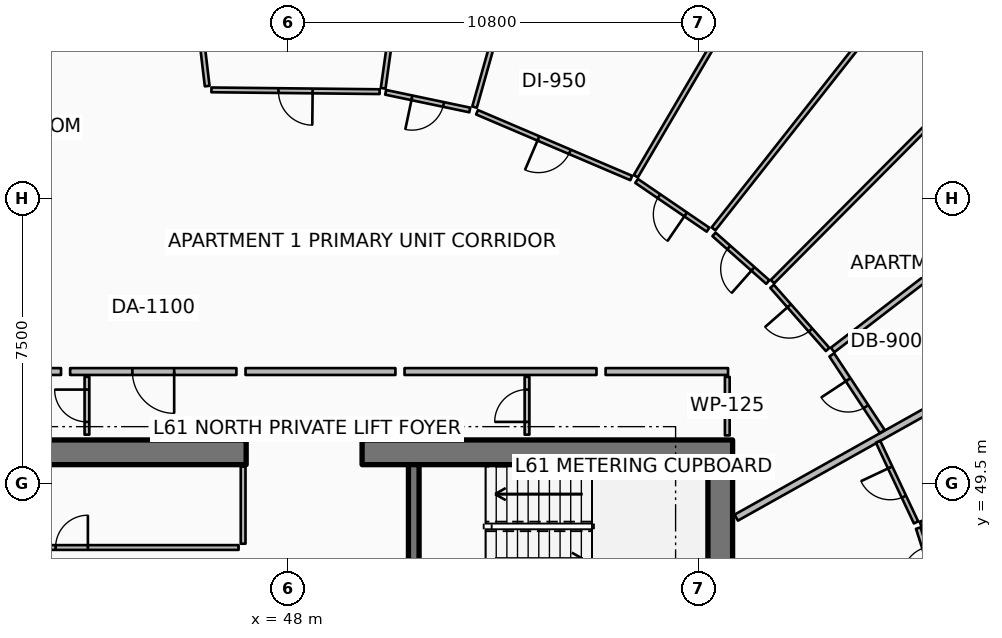
"""IFC4 building model, lengths in metres.
Left out: names, types, materials, properties, quantities, classifications, styles, units other than length and angle.
Written with IfcOpenShell. Run it as: python <this file> out.ifc"""

import sys

from ifc_helpers import new_model, si_unit, direction, frame, frame_2d, origin, place, context, subcontext, project, spatial, rectangle, extrude, element, fill, save


model = new_model("IFC4")
c1 = context("Model", 3, precision=1e-05, world=origin(), true_north=direction((0.0, 1.0)))
c2 = subcontext(c1, "Body", "Model", "MODEL_VIEW")
j1 = project(units=[si_unit("LENGTHUNIT", "METRE"), si_unit("PLANEANGLEUNIT", "RADIAN")], contexts=[c1])
p1 = place(None, origin())
s1 = spatial("IfcSite", under=j1, at=p1, CompositionType="ELEMENT")
p2 = place(p1, origin())
s2 = spatial("IfcBuilding", under=s1, at=p2, CompositionType="ELEMENT")
p3 = place(p2, frame((0.0, 0.0, 244.4)))
s3 = spatial("IfcBuildingStorey", under=s2, at=p3, CompositionType="ELEMENT", Elevation=244.4)
for number, where, z_axis, x_axis in (
    (1, (37.15, 50.325, 0.0), (0.0, 0.0, 1.0), (1.0, 0.0, 0.0)),
    (2, (49.95, 50.325, 0.0), (0.0, 0.0, 1.0), (1.0, 0.0, 0.0)),
):
    element("IfcWall", number, at=place(p3, frame(where, z_axis=z_axis, x_axis=x_axis)), inside=s3, PredefinedType="SHEAR", context=c2, shape_type="SweptSolid", body=[
        extrude(rectangle(XDim=9.75, YDim=0.65, at=frame_2d((4.875, 0.0))), origin(), (0.0, 0.0, 1.0), 3.85),
    ])
p4 = place(p3, frame((59.375, 34.0, 0.0), z_axis=(0.0, 0.0, 1.0), x_axis=(0.0, 1.0, 0.0)))
e3 = element("IfcWall", 3, at=p4, inside=s3, PredefinedType="SHEAR", context=c2, shape_type="SweptSolid", body=[
    extrude(rectangle(XDim=16.0, YDim=0.65, at=frame_2d((8.0, 0.0))), origin(), (0.0, 0.0, 1.0), 3.85),
])
p5 = place(p3, frame((51.31, 46.5, 0.0), z_axis=(0.0, 0.0, 1.0), x_axis=(0.0, 1.0, 0.0)))
e4 = element("IfcWall", 4, at=p5, inside=s3, PredefinedType="SHEAR", context=c2, shape_type="SweptSolid", body=[
    extrude(rectangle(XDim=3.5, YDim=0.28, at=frame_2d((1.75, 0.0))), origin(), (0.0, 0.0, 1.0), 3.85),
])
p6 = place(p3, frame((46.82, 47.92, 0.0), z_axis=(0.0, 0.0, 1.0), x_axis=(0.0, 1.0, 0.0)))
e5 = element("IfcWall", 5, at=p6, inside=s3, PredefinedType="PARTITIONING", context=c2, shape_type="SweptSolid", body=[
    extrude(rectangle(XDim=2.03, YDim=0.125, at=frame_2d((1.015, 0.0))), origin(), (0.0, 0.0, 1.0), 3.03),
])
p7 = place(p3, frame((37.92, 47.82, 0.0), z_axis=(0.0, 0.0, 1.0), x_axis=(1.0, 0.0, 0.0)))
e6 = element("IfcWall", 6, at=p7, inside=s3, PredefinedType="PARTITIONING", context=c2, shape_type="SweptSolid", body=[
    extrude(rectangle(XDim=8.78, YDim=0.125, at=frame_2d((4.39, 0.0))), origin(), (0.0, 0.0, 1.0), 3.03),
])
p8 = place(p7, frame((3.965, 0.0, 0.0)))
e7 = element("IfcOpeningElement", 7, at=p8, cuts=e6, PredefinedType="OPENING", context=c2, shape_type="SweptSolid", body=[
    extrude(rectangle(XDim=0.85, YDim=2.06, at=frame_2d((0.425, 1.03))), frame((0.0, 0.073, 0.0), z_axis=(0.0, -1.0, 0.0), x_axis=(1.0, 0.0, 0.0)), (0.0, 0.0, 1.0), 0.145),
])
p9 = place(p3, frame((59.56, 50.77, 0.0), z_axis=(0.0, 0.0, 1.0), x_axis=(0.0, 1.0, 0.0)))
e8 = element("IfcWall", 8, at=p9, inside=s3, PredefinedType="PARTITIONING", context=c2, shape_type="SweptSolid", body=[
    extrude(rectangle(XDim=1.54, YDim=0.125, at=frame_2d((0.77, 0.0))), origin(), (0.0, 0.0, 1.0), 3.03),
])
p10 = place(p3, frame((42.71, 50.79, 0.0), z_axis=(0.0, 0.0, 1.0), x_axis=(0.0, 1.0, 0.0)))
e9 = element("IfcWall", 9, at=p10, inside=s3, PredefinedType="PARTITIONING", context=c2, shape_type="SweptSolid", body=[
    extrude(rectangle(XDim=1.52, YDim=0.125, at=frame_2d((0.76, 0.0))), origin(), (0.0, 0.0, 1.0), 2.957),
])
p11 = place(p10, frame((0.335, 0.0, 0.0)))
e10 = element("IfcOpeningElement", 10, at=p11, cuts=e9, PredefinedType="OPENING", context=c2, shape_type="SweptSolid", body=[
    extrude(rectangle(XDim=0.85, YDim=2.06, at=frame_2d((0.425, 1.03))), frame((0.0, 0.073, 0.0), z_axis=(0.0, -1.0, 0.0), x_axis=(1.0, 0.0, 0.0)), (0.0, 0.0, 1.0), 0.145),
])
p12 = place(p3, frame((54.29, 50.79, 0.0), z_axis=(0.0, 0.0, 1.0), x_axis=(0.0, 1.0, 0.0)))
e11 = element("IfcWall", 11, at=p12, inside=s3, PredefinedType="PARTITIONING", context=c2, shape_type="SweptSolid", body=[
    extrude(rectangle(XDim=1.52, YDim=0.125, at=frame_2d((0.76, 0.0))), origin(), (0.0, 0.0, 1.0), 3.03),
])
p13 = place(p12, frame((0.335, 0.0, 0.0)))
e12 = element("IfcOpeningElement", 12, at=p13, cuts=e11, PredefinedType="OPENING", context=c2, shape_type="SweptSolid", body=[
    extrude(rectangle(XDim=0.85, YDim=2.06, at=frame_2d((0.425, 1.03))), frame((0.0, 0.073, 0.0), z_axis=(0.0, -1.0, 0.0), x_axis=(1.0, 0.0, 0.0)), (0.0, 0.0, 1.0), 0.145),
])
p14 = place(p3, frame((59.796, 48.606, 0.0), z_axis=(0.0, 0.0, 1.0), x_axis=(0.872493213488, 0.488626229767, 0.0)))
e13 = element("IfcWall", 13, at=p14, inside=s3, PredefinedType="PARTITIONING", context=c2, shape_type="SweptSolid", body=[
    extrude(rectangle(XDim=16.91, YDim=0.18, at=frame_2d((8.455, 0.0))), origin(), (0.0, 0.0, 1.0), 2.957),
])
p15 = place(p3, frame((46.643, 52.45, 0.0), z_axis=(0.0, 0.0, 1.0), x_axis=(-1.0, 0.0, 0.0)))
e14 = element("IfcWall", 14, at=p15, inside=s3, PredefinedType="PARTITIONING", context=c2, shape_type="SweptSolid", body=[
    extrude(rectangle(XDim=4.376, YDim=0.18, at=frame_2d((2.188, 0.0))), origin(), (0.0, 0.0, 1.0), 2.957),
])
p16 = place(p15, frame((1.638, 0.0, 0.0)))
e15 = element("IfcOpeningElement", 15, at=p16, cuts=e14, PredefinedType="OPENING", context=c2, shape_type="SweptSolid", body=[
    extrude(rectangle(XDim=1.1, YDim=2.1, at=frame_2d((0.55, 1.05))), frame((0.0, 0.1, 0.0), z_axis=(0.0, -1.0, 0.0), x_axis=(1.0, 0.0, 0.0)), (0.0, 0.0, 1.0), 0.2),
])
p17 = place(p3, frame((59.58, 52.45, 0.0), z_axis=(0.0, 0.0, 1.0), x_axis=(-1.0, 0.0, 0.0)))
e16 = element("IfcWall", 16, at=p17, inside=s3, PredefinedType="PARTITIONING", context=c2, shape_type="SweptSolid", body=[
    extrude(rectangle(XDim=3.222, YDim=0.18, at=frame_2d((1.611, 0.0))), origin(), (0.0, 0.0, 1.0), 2.957),
])
p18 = place(p3, frame((63.639, 50.872, 0.0), z_axis=(0.0, 0.0, 1.0), x_axis=(-0.550539267926, 0.834809268319, 0.0)))
e17 = element("IfcWall", 17, at=p18, inside=s3, PredefinedType="PARTITIONING", context=c2, shape_type="SweptSolid", body=[
    extrude(rectangle(XDim=2.414, YDim=0.15, at=frame_2d((1.207, 0.0))), origin(), (0.0, 0.0, 1.0), 2.957),
])
p19 = place(p18, frame((0.782, 0.0, 0.0)))
e18 = element("IfcOpeningElement", 18, at=p19, cuts=e17, PredefinedType="OPENING", context=c2, shape_type="SweptSolid", body=[
    extrude(rectangle(XDim=0.85, YDim=2.06, at=frame_2d((0.425, 1.03))), frame((0.0, 0.085, 0.0), z_axis=(0.0, -1.0, 0.0), x_axis=(1.0, 0.0, 0.0)), (0.0, 0.0, 1.0), 0.17),
])
p20 = place(p3, frame((62.331, 53.018, 0.0), z_axis=(0.0, 0.0, 1.0), x_axis=(0.792803030826, 0.609477935871, 0.0)))
e19 = element("IfcWall", 19, at=p20, inside=s3, PredefinedType="PARTITIONING", context=c2, shape_type="SweptSolid", body=[
    extrude(rectangle(XDim=4.46, YDim=0.15, at=frame_2d((2.23, 0.0))), origin(), (0.0, 0.0, 1.0), 3.03),
])
p21 = place(p3, frame((60.749, 54.815, 0.0), z_axis=(0.0, 0.0, 1.0), x_axis=(0.705267705861, 0.708941085753, 0.0)))
e20 = element("IfcWall", 20, at=p21, inside=s3, PredefinedType="PARTITIONING", context=c2, shape_type="SweptSolid", body=[
    extrude(rectangle(XDim=11.498, YDim=0.125, at=frame_2d((5.749, 0.0))), origin(), (0.0, 0.0, 1.0), 3.03),
])
p22 = place(p3, frame((62.2, 53.031, 0.0), z_axis=(0.0, 0.0, 1.0), x_axis=(-0.660650282497, 0.750693815238, 0.0)))
e21 = element("IfcWall", 21, at=p22, inside=s3, PredefinedType="PARTITIONING", context=c2, shape_type="SweptSolid", body=[
    extrude(rectangle(XDim=2.212, YDim=0.125, at=frame_2d((1.106, 0.0))), origin(), (0.0, 0.0, 1.0), 3.03),
])
p23 = place(p22, frame((0.681, 0.0, 0.0)))
e22 = element("IfcOpeningElement", 22, at=p23, cuts=e21, PredefinedType="OPENING", context=c2, shape_type="SweptSolid", body=[
    extrude(rectangle(XDim=0.85, YDim=2.06, at=frame_2d((0.425, 1.03))), frame((0.0, 0.073, 0.0), z_axis=(0.0, -1.0, 0.0), x_axis=(1.0, 0.0, 0.0)), (0.0, 0.0, 1.0), 0.145),
])
p24 = place(p3, frame((60.626, 54.805, 0.0), z_axis=(0.0, 0.0, 1.0), x_axis=(-0.748419746602, 0.663225363581, 0.0)))
e23 = element("IfcWall", 23, at=p24, inside=s3, PredefinedType="PARTITIONING", context=c2, shape_type="SweptSolid", body=[
    extrude(rectangle(XDim=1.891, YDim=0.125, at=frame_2d((0.946, 0.0))), origin(), (0.0, 0.0, 1.0), 2.957),
])
p25 = place(p24, frame((0.521, 0.0, 0.0)))
e24 = element("IfcOpeningElement", 24, at=p25, cuts=e23, PredefinedType="OPENING", context=c2, shape_type="SweptSolid", body=[
    extrude(rectangle(XDim=0.85, YDim=2.06, at=frame_2d((0.425, 1.03))), frame((0.0, 0.073, 0.0), z_axis=(0.0, -1.0, 0.0), x_axis=(1.0, 0.0, 0.0)), (0.0, 0.0, 1.0), 0.145),
])
p26 = place(p3, frame((56.118, 52.45, 0.0), z_axis=(0.0, 0.0, 1.0), x_axis=(-1.0, 0.0, 0.0)))
e25 = element("IfcWall", 25, at=p26, inside=s3, PredefinedType="PARTITIONING", context=c2, shape_type="SweptSolid", body=[
    extrude(rectangle(XDim=5.051, YDim=0.18, at=frame_2d((2.525, 0.0))), origin(), (0.0, 0.0, 1.0), 2.957),
])
p27 = place(p3, frame((59.198, 56.204, 0.0), z_axis=(0.0, 0.0, 1.0), x_axis=(0.619101452742, 0.785311015593, 0.0)))
e26 = element("IfcWall", 26, at=p27, inside=s3, PredefinedType="PARTITIONING", context=c2, shape_type="SweptSolid", body=[
    extrude(rectangle(XDim=11.509, YDim=0.125, at=frame_2d((5.754, 0.0))), origin(), (0.0, 0.0, 1.0), 2.957),
])
p28 = place(p3, frame((57.153, 57.588, 0.0), z_axis=(0.0, 0.0, 1.0), x_axis=(0.506323477253, 0.862343630105, 0.0)))
e27 = element("IfcWall", 27, at=p28, inside=s3, PredefinedType="PARTITIONING", context=c2, shape_type="SweptSolid", body=[
    extrude(rectangle(XDim=9.988, YDim=0.125, at=frame_2d((4.994, 0.0))), origin(), (0.0, 0.0, 1.0), 3.03),
])
p29 = place(p3, frame((59.053, 56.182, 0.0), z_axis=(0.0, 0.0, 1.0), x_axis=(-0.825709590898, 0.56409544538, 0.0)))
e28 = element("IfcWall", 28, at=p29, inside=s3, PredefinedType="PARTITIONING", context=c2, shape_type="SweptSolid", body=[
    extrude(rectangle(XDim=2.276, YDim=0.125, at=frame_2d((1.138, 0.0))), origin(), (0.0, 0.0, 1.0), 2.957),
])
p30 = place(p29, frame((0.713, 0.0, 0.0)))
e29 = element("IfcOpeningElement", 29, at=p30, cuts=e28, PredefinedType="OPENING", context=c2, shape_type="SweptSolid", body=[
    extrude(rectangle(XDim=0.85, YDim=2.06, at=frame_2d((0.425, 1.03))), frame((0.0, 0.073, 0.0), z_axis=(0.0, -1.0, 0.0), x_axis=(1.0, 0.0, 0.0)), (0.0, 0.0, 1.0), 0.145),
])
p31 = place(p3, frame((57.034, 57.542, 0.0), z_axis=(0.0, 0.0, 1.0), x_axis=(-0.919921628857, 0.392102278445, 0.0)))
e30 = element("IfcWall", 30, at=p31, inside=s3, PredefinedType="PARTITIONING", context=c2, shape_type="SweptSolid", body=[
    extrude(rectangle(XDim=4.413, YDim=0.125, at=frame_2d((2.206, 0.0))), origin(), (0.0, 0.0, 1.0), 2.957),
])
p32 = place(p31, frame((1.756, 0.0, 0.0)))
e31 = element("IfcOpeningElement", 31, at=p32, cuts=e30, PredefinedType="OPENING", context=c2, shape_type="SweptSolid", body=[
    extrude(rectangle(XDim=0.9, YDim=2.08, at=frame_2d((0.45, 1.04))), frame((0.0, 0.073, 0.0), z_axis=(0.0, -1.0, 0.0), x_axis=(1.0, 0.0, 0.0)), (0.0, 0.0, 1.0), 0.145),
])
p33 = place(p3, frame((50.827, 52.45, 0.0), z_axis=(0.0, 0.0, 1.0), x_axis=(-1.0, 0.0, 0.0)))
e32 = element("IfcWall", 32, at=p33, inside=s3, PredefinedType="PARTITIONING", context=c2, shape_type="SweptSolid", body=[
    extrude(rectangle(XDim=3.944, YDim=0.18, at=frame_2d((1.972, 0.0))), origin(), (0.0, 0.0, 1.0), 2.957),
])
p34 = place(p3, frame((52.909, 59.408, 0.0), z_axis=(0.0, 0.0, 1.0), x_axis=(0.271454299549, 0.962451330331, 0.0)))
e33 = element("IfcWall", 33, at=p34, inside=s3, PredefinedType="PARTITIONING", context=c2, shape_type="SweptSolid", body=[
    extrude(rectangle(XDim=8.897, YDim=0.125, at=frame_2d((4.449, 0.0))), origin(), (0.0, 0.0, 1.0), 2.957),
])
p35 = place(p3, frame((45.874, 59.962, 0.0), z_axis=(0.0, 0.0, 1.0), x_axis=(-0.117533659592, 0.993068899353, 0.0)))
e34 = element("IfcWall", 34, at=p35, inside=s3, PredefinedType="PARTITIONING", context=c2, shape_type="SweptSolid", body=[
    extrude(rectangle(XDim=6.608, YDim=0.125, at=frame_2d((3.304, 0.0))), origin(), (0.0, 0.0, 1.0), 2.957),
])
p36 = place(p3, frame((50.505, 59.903, 0.0), z_axis=(0.0, 0.0, 1.0), x_axis=(0.138550424847, 0.990355380545, 0.0)))
e35 = element("IfcWall", 35, at=p36, inside=s3, PredefinedType="PARTITIONING", context=c2, shape_type="SweptSolid", body=[
    extrude(rectangle(XDim=7.669, YDim=0.125, at=frame_2d((3.834, 0.0))), origin(), (0.0, 0.0, 1.0), 3.03),
])
p37 = place(p3, frame((52.784, 59.332, 0.0), z_axis=(0.0, 0.0, 1.0), x_axis=(-0.978655016217, 0.205509997891, 0.0)))
e36 = element("IfcWall", 36, at=p37, inside=s3, PredefinedType="PARTITIONING", context=c2, shape_type="SweptSolid", body=[
    extrude(rectangle(XDim=2.262, YDim=0.125, at=frame_2d((1.131, 0.0))), origin(), (0.0, 0.0, 1.0), 2.957),
])
p38 = place(p37, frame((0.706, 0.0, 0.0)))
e37 = element("IfcOpeningElement", 37, at=p38, cuts=e36, PredefinedType="OPENING", context=c2, shape_type="SweptSolid", body=[
    extrude(rectangle(XDim=0.85, YDim=2.06, at=frame_2d((0.425, 1.03))), frame((0.0, 0.073, 0.0), z_axis=(0.0, -1.0, 0.0), x_axis=(1.0, 0.0, 0.0)), (0.0, 0.0, 1.0), 0.145),
])
p39 = place(p3, frame((50.412, 59.814, 0.0), z_axis=(0.0, 0.0, 1.0), x_axis=(-0.999943934923, 0.01058900422, 0.0)))
e38 = element("IfcWall", 38, at=p39, inside=s3, PredefinedType="PARTITIONING", context=c2, shape_type="SweptSolid", body=[
    extrude(rectangle(XDim=4.427, YDim=0.125, at=frame_2d((2.213, 0.0))), origin(), (0.0, 0.0, 1.0), 3.03),
])
p40 = place(p39, frame((1.763, 0.0, 0.0)))
e39 = element("IfcOpeningElement", 39, at=p40, cuts=e38, PredefinedType="OPENING", context=c2, shape_type="SweptSolid", body=[
    extrude(rectangle(XDim=0.9, YDim=2.08, at=frame_2d((0.45, 1.04))), frame((0.0, 0.073, 0.0), z_axis=(0.0, -1.0, 0.0), x_axis=(1.0, 0.0, 0.0)), (0.0, 0.0, 1.0), 0.145),
])
p41 = place(p3, frame((42.028, 52.45, 0.0), z_axis=(0.0, 0.0, 1.0), x_axis=(-1.0, 0.0, 0.0)))
e40 = element("IfcWall", 40, at=p41, inside=s3, PredefinedType="PARTITIONING", context=c2, shape_type="SweptSolid", body=[
    extrude(rectangle(XDim=4.758, YDim=0.18, at=frame_2d((2.379, 0.0))), origin(), (0.0, 0.0, 1.0), 2.957),
])
p42 = place(p3, frame((64.645, 48.439, 0.0), z_axis=(0.0, 0.0, 1.0), x_axis=(0.93263897003, 0.360810963778, 0.0)))
e41 = element("IfcWall", 41, at=p42, inside=s3, PredefinedType="PARTITIONING", context=c2, shape_type="SweptSolid", body=[
    extrude(rectangle(XDim=12.043, YDim=0.125, at=frame_2d((6.021, 0.0))), origin(), (0.0, 0.0, 1.0), 3.03),
])
p43 = place(p3, frame((65.175, 46.492, 0.0), z_axis=(0.0, 0.0, 1.0), x_axis=(-0.305358332679, 0.952237516938, 0.0)))
e42 = element("IfcWall", 42, at=p43, inside=s3, PredefinedType="PARTITIONING", context=c2, shape_type="SweptSolid", body=[
    extrude(rectangle(XDim=1.931, YDim=0.125, at=frame_2d((0.965, 0.0))), origin(), (0.0, 0.0, 1.0), 3.03),
])
p44 = place(p43, frame((0.54, 0.0, 0.0)))
e43 = element("IfcOpeningElement", 43, at=p44, cuts=e42, PredefinedType="OPENING", context=c2, shape_type="SweptSolid", body=[
    extrude(rectangle(XDim=0.85, YDim=2.06, at=frame_2d((0.425, 1.03))), frame((0.0, 0.073, 0.0), z_axis=(0.0, -1.0, 0.0), x_axis=(1.0, 0.0, 0.0)), (0.0, 0.0, 1.0), 0.145),
])
p45 = place(p3, frame((64.527, 48.479, 0.0), z_axis=(0.0, 0.0, 1.0), x_axis=(-0.425751972865, 0.904839907167, 0.0)))
e44 = element("IfcWall", 44, at=p45, inside=s3, PredefinedType="PARTITIONING", context=c2, shape_type="SweptSolid", body=[
    extrude(rectangle(XDim=2.348, YDim=0.125, at=frame_2d((1.174, 0.0))), origin(), (0.0, 0.0, 1.0), 2.957),
])
p46 = place(p45, frame((0.749, 0.0, 0.0)))
e45 = element("IfcOpeningElement", 45, at=p46, cuts=e44, PredefinedType="OPENING", context=c2, shape_type="SweptSolid", body=[
    extrude(rectangle(XDim=0.85, YDim=2.06, at=frame_2d((0.425, 1.03))), frame((0.0, 0.073, 0.0), z_axis=(0.0, -1.0, 0.0), x_axis=(1.0, 0.0, 0.0)), (0.0, 0.0, 1.0), 0.145),
])
p47 = place(p8, origin())
e46 = element("IfcDoor", 46, at=p47, inside=s3, OperationType="SINGLE_SWING_RIGHT", PredefinedType="DOOR", context=c2, shape_type="SweptSolid", body=[
    extrude(rectangle(XDim=0.85, YDim=2.06, at=frame_2d((0.425, 1.03))), frame((0.0, 0.025, 0.0), z_axis=(0.0, -1.0, 0.0), x_axis=(1.0, 0.0, 0.0)), (0.0, 0.0, 1.0), 0.05),
])
fill(e7, e46)
p48 = place(p11, origin())
e47 = element("IfcDoor", 47, at=p48, inside=s3, OperationType="SINGLE_SWING_RIGHT", PredefinedType="DOOR", context=c2, shape_type="SweptSolid", body=[
    extrude(rectangle(XDim=0.85, YDim=2.06, at=frame_2d((0.425, 1.03))), frame((0.0, 0.025, 0.0), z_axis=(0.0, -1.0, 0.0), x_axis=(1.0, 0.0, 0.0)), (0.0, 0.0, 1.0), 0.05),
])
fill(e10, e47)
p49 = place(p13, origin())
e48 = element("IfcDoor", 48, at=p49, inside=s3, OperationType="SINGLE_SWING_LEFT", PredefinedType="DOOR", context=c2, shape_type="SweptSolid", body=[
    extrude(rectangle(XDim=0.85, YDim=2.06, at=frame_2d((0.425, 1.03))), frame((0.0, 0.025, 0.0), z_axis=(0.0, -1.0, 0.0), x_axis=(1.0, 0.0, 0.0)), (0.0, 0.0, 1.0), 0.05),
])
fill(e12, e48)
p50 = place(p16, origin())
e49 = element("IfcDoor", 49, at=p50, inside=s3, OperationType="SINGLE_SWING_LEFT", PredefinedType="DOOR", context=c2, shape_type="SweptSolid", body=[
    extrude(rectangle(XDim=1.1, YDim=2.1, at=frame_2d((0.55, 1.05))), frame((0.0, 0.025, 0.0), z_axis=(0.0, -1.0, 0.0), x_axis=(1.0, 0.0, 0.0)), (0.0, 0.0, 1.0), 0.05),
])
fill(e15, e49)
p51 = place(p19, origin())
e50 = element("IfcDoor", 50, at=p51, inside=s3, OperationType="SINGLE_SWING_RIGHT", PredefinedType="DOOR", context=c2, shape_type="SweptSolid", body=[
    extrude(rectangle(XDim=0.85, YDim=2.06, at=frame_2d((0.425, 1.03))), frame((0.0, 0.025, 0.0), z_axis=(0.0, -1.0, 0.0), x_axis=(1.0, 0.0, 0.0)), (0.0, 0.0, 1.0), 0.05),
])
fill(e18, e50)
p52 = place(p23, origin())
e51 = element("IfcDoor", 51, at=p52, inside=s3, OperationType="SINGLE_SWING_RIGHT", PredefinedType="DOOR", context=c2, shape_type="SweptSolid", body=[
    extrude(rectangle(XDim=0.85, YDim=2.06, at=frame_2d((0.425, 1.03))), frame((0.0, 0.025, 0.0), z_axis=(0.0, -1.0, 0.0), x_axis=(1.0, 0.0, 0.0)), (0.0, 0.0, 1.0), 0.05),
])
fill(e22, e51)
p53 = place(p25, origin())
e52 = element("IfcDoor", 52, at=p53, inside=s3, OperationType="SINGLE_SWING_LEFT", PredefinedType="DOOR", context=c2, shape_type="SweptSolid", body=[
    extrude(rectangle(XDim=0.85, YDim=2.06, at=frame_2d((0.425, 1.03))), frame((0.0, 0.025, 0.0), z_axis=(0.0, -1.0, 0.0), x_axis=(1.0, 0.0, 0.0)), (0.0, 0.0, 1.0), 0.05),
])
fill(e24, e52)
p54 = place(p30, origin())
e53 = element("IfcDoor", 53, at=p54, inside=s3, OperationType="SINGLE_SWING_LEFT", PredefinedType="DOOR", context=c2, shape_type="SweptSolid", body=[
    extrude(rectangle(XDim=0.85, YDim=2.06, at=frame_2d((0.425, 1.03))), frame((0.0, 0.025, 0.0), z_axis=(0.0, -1.0, 0.0), x_axis=(1.0, 0.0, 0.0)), (0.0, 0.0, 1.0), 0.05),
])
fill(e29, e53)
p55 = place(p32, origin())
e54 = element("IfcDoor", 54, at=p55, inside=s3, OperationType="SINGLE_SWING_RIGHT", PredefinedType="DOOR", context=c2, shape_type="SweptSolid", body=[
    extrude(rectangle(XDim=0.9, YDim=2.08, at=frame_2d((0.45, 1.04))), frame((0.0, 0.025, 0.0), z_axis=(0.0, -1.0, 0.0), x_axis=(1.0, 0.0, 0.0)), (0.0, 0.0, 1.0), 0.05),
])
fill(e31, e54)
p56 = place(p38, origin())
e55 = element("IfcDoor", 55, at=p56, inside=s3, OperationType="SINGLE_SWING_RIGHT", PredefinedType="DOOR", context=c2, shape_type="SweptSolid", body=[
    extrude(rectangle(XDim=0.85, YDim=2.06, at=frame_2d((0.425, 1.03))), frame((0.0, 0.025, 0.0), z_axis=(0.0, -1.0, 0.0), x_axis=(1.0, 0.0, 0.0)), (0.0, 0.0, 1.0), 0.05),
])
fill(e37, e55)
p57 = place(p40, origin())
e56 = element("IfcDoor", 56, at=p57, inside=s3, OperationType="SINGLE_SWING_LEFT", PredefinedType="DOOR", context=c2, shape_type="SweptSolid", body=[
    extrude(rectangle(XDim=0.9, YDim=2.08, at=frame_2d((0.45, 1.04))), frame((0.0, 0.025, 0.0), z_axis=(0.0, -1.0, 0.0), x_axis=(1.0, 0.0, 0.0)), (0.0, 0.0, 1.0), 0.05),
])
fill(e39, e56)
p58 = place(p46, origin())
e57 = element("IfcDoor", 57, at=p58, inside=s3, OperationType="SINGLE_SWING_RIGHT", PredefinedType="DOOR", context=c2, shape_type="SweptSolid", body=[
    extrude(rectangle(XDim=0.85, YDim=2.06, at=frame_2d((0.425, 1.03))), frame((0.0, 0.025, 0.0), z_axis=(0.0, -1.0, 0.0), x_axis=(1.0, 0.0, 0.0)), (0.0, 0.0, 1.0), 0.05),
])
fill(e45, e57)
save(model, sys.argv[1])
